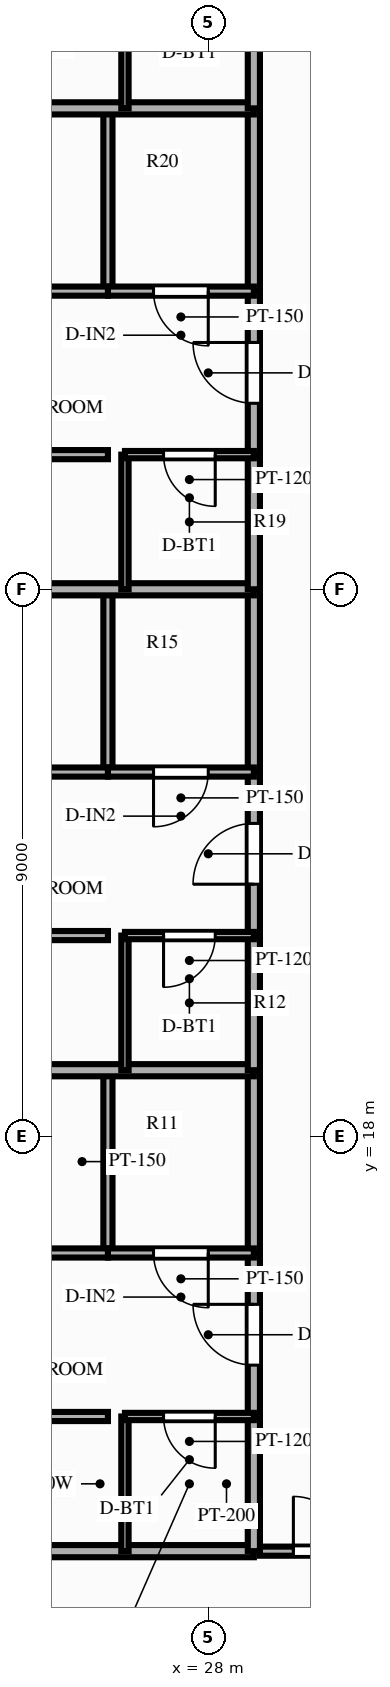
"""IFC4 building model, lengths in metres.
Left out: names, types, materials, properties, quantities, classifications, styles, units other than length and angle.
Written with IfcOpenShell. Run it as: python <this file> out.ifc"""

import sys

from ifc_helpers import new_model, si_unit, direction, frame, frame_2d, origin, place, context, subcontext, project, spatial, rectangle, extrude, source, transform, mapped, element, fill, save


model = new_model("IFC4")
c1 = context("Model", 3, precision=1e-05, world=origin(), true_north=direction((0.0, 1.0)))
c2 = subcontext(c1, "Body", "Model", "MODEL_VIEW")
j1 = project(units=[si_unit("LENGTHUNIT", "METRE"), si_unit("PLANEANGLEUNIT", "RADIAN")], contexts=[c1])
p1 = place(None, origin())
s1 = spatial("IfcSite", under=j1, at=p1, CompositionType="ELEMENT")
p2 = place(p1, origin())
s2 = spatial("IfcBuilding", under=s1, at=p2, CompositionType="ELEMENT")
p3 = place(p2, frame((0.0, 0.0, 192.7)))
s3 = spatial("IfcBuildingStorey", under=s2, at=p3, CompositionType="ELEMENT", Elevation=192.7)
p4 = place(p3, frame((28.85, 11.18, 0.0), z_axis=(0.0, 0.0, 1.0), x_axis=(1.0, 0.0, 0.0)))
e1 = element("IfcWall", 1, at=p4, inside=s3, PredefinedType="PARTITIONING", context=c2, shape_type="SweptSolid", body=[
    extrude(rectangle(XDim=2.33, YDim=0.15, at=frame_2d((1.165, 0.0))), origin(), (0.0, 0.0, 1.0), 2.24),
])
p5 = place(p4, frame((0.55, 0.0, 0.0)))
e2 = element("IfcOpeningElement", 2, at=p5, cuts=e1, PredefinedType="OPENING", context=c2, shape_type="SweptSolid", body=[
    extrude(rectangle(XDim=0.9, YDim=2.1, at=frame_2d((0.45, 1.05))), frame((0.0, 0.087, 0.0), z_axis=(0.0, -1.0, 0.0), x_axis=(1.0, 0.0, 0.0)), (0.0, 0.0, 1.0), 0.174),
])
p6 = place(p3, frame((28.75, 11.18, 0.0), z_axis=(0.0, 0.0, 1.0), x_axis=(-1.0, 0.0, 0.0)))
e3 = element("IfcWall", 3, at=p6, inside=s3, PredefinedType="PARTITIONING", context=c2, shape_type="SweptSolid", body=[
    extrude(rectangle(XDim=10.85, YDim=0.2, at=frame_2d((5.425, 0.0))), origin(), (0.0, 0.0, 1.0), 2.24),
])
p7 = place(p3, frame((28.75, 11.18, 0.0), z_axis=(0.0, 0.0, 1.0), x_axis=(0.0, 1.0, 0.0)))
e4 = element("IfcWall", 4, at=p7, inside=s3, PredefinedType="PARTITIONING", context=c2, shape_type="SweptSolid", body=[
    extrude(rectangle(XDim=2.215, YDim=0.2, at=frame_2d((1.107, 0.0))), origin(), (0.0, 0.0, 1.0), 3.56),
])
p8 = place(p3, frame((28.75, 13.395, 0.0), z_axis=(0.0, 0.0, 1.0), x_axis=(0.0, 1.0, 0.0)))
e5 = element("IfcWall", 5, at=p8, inside=s3, PredefinedType="PARTITIONING", context=c2, shape_type="SweptSolid", body=[
    extrude(rectangle(XDim=2.689, YDim=0.2, at=frame_2d((1.345, 0.0))), origin(), (0.0, 0.0, 1.0), 3.56),
])
p9 = place(p8, frame((0.845, 0.0, 0.0)))
e6 = element("IfcOpeningElement", 6, at=p9, cuts=e5, PredefinedType="OPENING", context=c2, shape_type="SweptSolid", body=[
    extrude(rectangle(XDim=1.0, YDim=2.15, at=frame_2d((0.5, 1.075))), frame((0.0, 0.112, 0.0), z_axis=(0.0, -1.0, 0.0), x_axis=(1.0, 0.0, 0.0)), (0.0, 0.0, 1.0), 0.224),
])
p10 = place(p3, frame((28.75, 16.084, 0.0), z_axis=(0.0, 0.0, 1.0), x_axis=(0.0, 1.0, 0.0)))
e7 = element("IfcWall", 7, at=p10, inside=s3, PredefinedType="PARTITIONING", context=c2, shape_type="SweptSolid", body=[
    extrude(rectangle(XDim=3.006, YDim=0.2, at=frame_2d((1.503, 0.0))), origin(), (0.0, 0.0, 1.0), 3.56),
])
p11 = place(p3, frame((26.63, 11.18, 0.0), z_axis=(0.0, 0.0, 1.0), x_axis=(0.0, 1.0, 0.0)))
e8 = element("IfcWall", 8, at=p11, inside=s3, PredefinedType="PARTITIONING", context=c2, shape_type="SweptSolid", body=[
    extrude(rectangle(XDim=2.215, YDim=0.12, at=frame_2d((1.107, 0.0))), origin(), (0.0, 0.0, 1.0), 3.56),
])
p12 = place(p3, frame((26.35, 16.084, 0.0), z_axis=(0.0, 0.0, 1.0), x_axis=(0.0, 1.0, 0.0)))
e9 = element("IfcWall", 9, at=p12, inside=s3, PredefinedType="PARTITIONING", context=c2, shape_type="SweptSolid", body=[
    extrude(rectangle(XDim=3.006, YDim=0.15, at=frame_2d((1.503, 0.0))), origin(), (0.0, 0.0, 1.0), 3.56),
])
p13 = place(p3, frame((28.75, 13.395, 0.0), z_axis=(0.0, 0.0, 1.0), x_axis=(-1.0, 0.0, 0.0)))
e10 = element("IfcWall", 10, at=p13, inside=s3, PredefinedType="PARTITIONING", context=c2, shape_type="SweptSolid", body=[
    extrude(rectangle(XDim=2.12, YDim=0.12, at=frame_2d((1.06, 0.0))), origin(), (0.0, 0.0, 1.0), 3.56),
])
p14 = place(p13, frame((0.635, 0.0, 0.0)))
e11 = element("IfcOpeningElement", 11, at=p14, cuts=e10, PredefinedType="OPENING", context=c2, shape_type="SweptSolid", body=[
    extrude(rectangle(XDim=0.85, YDim=2.05, at=frame_2d((0.425, 1.025))), frame((0.0, 0.072, 0.0), z_axis=(0.0, -1.0, 0.0), x_axis=(1.0, 0.0, 0.0)), (0.0, 0.0, 1.0), 0.144),
])
p15 = place(p3, frame((26.35, 13.395, 0.0), z_axis=(0.0, 0.0, 1.0), x_axis=(-1.0, 0.0, 0.0)))
e12 = element("IfcWall", 12, at=p15, inside=s3, PredefinedType="PARTITIONING", context=c2, shape_type="SweptSolid", body=[
    extrude(rectangle(XDim=8.45, YDim=0.15, at=frame_2d((4.225, 0.0))), origin(), (0.0, 0.0, 1.0), 3.56),
])
p16 = place(p15, frame((4.364, 0.0, 0.0)))
e13 = element("IfcOpeningElement", 13, at=p16, cuts=e12, PredefinedType="OPENING", context=c2, shape_type="SweptSolid", body=[
    extrude(rectangle(XDim=0.9, YDim=2.1, at=frame_2d((0.45, 1.05))), frame((0.0, 0.087, 0.0), z_axis=(0.0, -1.0, 0.0), x_axis=(1.0, 0.0, 0.0)), (0.0, 0.0, 1.0), 0.174),
])
p17 = place(p3, frame((28.75, 16.084, 0.0), z_axis=(0.0, 0.0, 1.0), x_axis=(-1.0, 0.0, 0.0)))
e14 = element("IfcWall", 14, at=p17, inside=s3, PredefinedType="PARTITIONING", context=c2, shape_type="SweptSolid", body=[
    extrude(rectangle(XDim=2.4, YDim=0.15, at=frame_2d((1.2, 0.0))), origin(), (0.0, 0.0, 1.0), 3.56),
])
p18 = place(p17, frame((0.75, 0.0, 0.0)))
e15 = element("IfcOpeningElement", 15, at=p18, cuts=e14, PredefinedType="OPENING", context=c2, shape_type="SweptSolid", body=[
    extrude(rectangle(XDim=0.9, YDim=2.1, at=frame_2d((0.45, 1.05))), frame((0.0, 0.087, 0.0), z_axis=(0.0, -1.0, 0.0), x_axis=(1.0, 0.0, 0.0)), (0.0, 0.0, 1.0), 0.174),
])
p19 = place(p3, frame((26.35, 16.084, 0.0), z_axis=(0.0, 0.0, 1.0), x_axis=(-1.0, 0.0, 0.0)))
e16 = element("IfcWall", 16, at=p19, inside=s3, PredefinedType="PARTITIONING", context=c2, shape_type="SweptSolid", body=[
    extrude(rectangle(XDim=8.45, YDim=0.15, at=frame_2d((4.225, 0.0))), origin(), (0.0, 0.0, 1.0), 3.56),
])
p20 = place(p19, frame((4.364, 0.0, 0.0)))
e17 = element("IfcOpeningElement", 17, at=p20, cuts=e16, PredefinedType="OPENING", context=c2, shape_type="SweptSolid", body=[
    extrude(rectangle(XDim=0.9, YDim=2.1, at=frame_2d((0.45, 1.05))), frame((0.0, 0.087, 0.0), z_axis=(0.0, -1.0, 0.0), x_axis=(1.0, 0.0, 0.0)), (0.0, 0.0, 1.0), 0.174),
])
p21 = place(p3, frame((28.75, 19.09, 0.0), z_axis=(0.0, 0.0, 1.0), x_axis=(-1.0, 0.0, 0.0)))
e18 = element("IfcWall", 18, at=p21, inside=s3, PredefinedType="PARTITIONING", context=c2, shape_type="SweptSolid", body=[
    extrude(rectangle(XDim=10.85, YDim=0.2, at=frame_2d((5.425, 0.0))), origin(), (0.0, 0.0, 1.0), 3.56),
])
p22 = place(p3, frame((28.75, 19.09, 0.0), z_axis=(0.0, 0.0, 1.0), x_axis=(0.0, 1.0, 0.0)))
e19 = element("IfcWall", 19, at=p22, inside=s3, PredefinedType="PARTITIONING", context=c2, shape_type="SweptSolid", body=[
    extrude(rectangle(XDim=2.215, YDim=0.2, at=frame_2d((1.107, 0.0))), origin(), (0.0, 0.0, 1.0), 3.56),
])
p23 = place(p3, frame((28.75, 21.305, 0.0), z_axis=(0.0, 0.0, 1.0), x_axis=(0.0, 1.0, 0.0)))
e20 = element("IfcWall", 20, at=p23, inside=s3, PredefinedType="PARTITIONING", context=c2, shape_type="SweptSolid", body=[
    extrude(rectangle(XDim=2.689, YDim=0.2, at=frame_2d((1.345, 0.0))), origin(), (0.0, 0.0, 1.0), 3.56),
])
p24 = place(p23, frame((0.845, 0.0, 0.0)))
e21 = element("IfcOpeningElement", 21, at=p24, cuts=e20, PredefinedType="OPENING", context=c2, shape_type="SweptSolid", body=[
    extrude(rectangle(XDim=1.0, YDim=2.15, at=frame_2d((0.5, 1.075))), frame((0.0, 0.112, 0.0), z_axis=(0.0, -1.0, 0.0), x_axis=(1.0, 0.0, 0.0)), (0.0, 0.0, 1.0), 0.224),
])
p25 = place(p3, frame((28.75, 23.994, 0.0), z_axis=(0.0, 0.0, 1.0), x_axis=(0.0, 1.0, 0.0)))
e22 = element("IfcWall", 22, at=p25, inside=s3, PredefinedType="PARTITIONING", context=c2, shape_type="SweptSolid", body=[
    extrude(rectangle(XDim=3.006, YDim=0.2, at=frame_2d((1.503, 0.0))), origin(), (0.0, 0.0, 1.0), 3.56),
])
p26 = place(p3, frame((26.63, 19.09, 0.0), z_axis=(0.0, 0.0, 1.0), x_axis=(0.0, 1.0, 0.0)))
e23 = element("IfcWall", 23, at=p26, inside=s3, PredefinedType="PARTITIONING", context=c2, shape_type="SweptSolid", body=[
    extrude(rectangle(XDim=2.215, YDim=0.12, at=frame_2d((1.107, 0.0))), origin(), (0.0, 0.0, 1.0), 3.56),
])
p27 = place(p3, frame((26.35, 23.994, 0.0), z_axis=(0.0, 0.0, 1.0), x_axis=(0.0, 1.0, 0.0)))
e24 = element("IfcWall", 24, at=p27, inside=s3, PredefinedType="PARTITIONING", context=c2, shape_type="SweptSolid", body=[
    extrude(rectangle(XDim=3.006, YDim=0.15, at=frame_2d((1.503, 0.0))), origin(), (0.0, 0.0, 1.0), 3.56),
])
p28 = place(p3, frame((28.75, 21.305, 0.0), z_axis=(0.0, 0.0, 1.0), x_axis=(-1.0, 0.0, 0.0)))
e25 = element("IfcWall", 25, at=p28, inside=s3, PredefinedType="PARTITIONING", context=c2, shape_type="SweptSolid", body=[
    extrude(rectangle(XDim=2.12, YDim=0.12, at=frame_2d((1.06, 0.0))), origin(), (0.0, 0.0, 1.0), 3.56),
])
p29 = place(p28, frame((0.635, 0.0, 0.0)))
e26 = element("IfcOpeningElement", 26, at=p29, cuts=e25, PredefinedType="OPENING", context=c2, shape_type="SweptSolid", body=[
    extrude(rectangle(XDim=0.85, YDim=2.05, at=frame_2d((0.425, 1.025))), frame((0.0, 0.072, 0.0), z_axis=(0.0, -1.0, 0.0), x_axis=(1.0, 0.0, 0.0)), (0.0, 0.0, 1.0), 0.144),
])
p30 = place(p3, frame((26.35, 21.305, 0.0), z_axis=(0.0, 0.0, 1.0), x_axis=(-1.0, 0.0, 0.0)))
e27 = element("IfcWall", 27, at=p30, inside=s3, PredefinedType="PARTITIONING", context=c2, shape_type="SweptSolid", body=[
    extrude(rectangle(XDim=8.45, YDim=0.15, at=frame_2d((4.225, 0.0))), origin(), (0.0, 0.0, 1.0), 3.56),
])
p31 = place(p30, frame((4.364, 0.0, 0.0)))
e28 = element("IfcOpeningElement", 28, at=p31, cuts=e27, PredefinedType="OPENING", context=c2, shape_type="SweptSolid", body=[
    extrude(rectangle(XDim=0.9, YDim=2.1, at=frame_2d((0.45, 1.05))), frame((0.0, 0.087, 0.0), z_axis=(0.0, -1.0, 0.0), x_axis=(1.0, 0.0, 0.0)), (0.0, 0.0, 1.0), 0.174),
])
p32 = place(p3, frame((28.75, 23.994, 0.0), z_axis=(0.0, 0.0, 1.0), x_axis=(-1.0, 0.0, 0.0)))
e29 = element("IfcWall", 29, at=p32, inside=s3, PredefinedType="PARTITIONING", context=c2, shape_type="SweptSolid", body=[
    extrude(rectangle(XDim=2.4, YDim=0.15, at=frame_2d((1.2, 0.0))), origin(), (0.0, 0.0, 1.0), 3.56),
])
p33 = place(p32, frame((0.75, 0.0, 0.0)))
e30 = element("IfcOpeningElement", 30, at=p33, cuts=e29, PredefinedType="OPENING", context=c2, shape_type="SweptSolid", body=[
    extrude(rectangle(XDim=0.9, YDim=2.1, at=frame_2d((0.45, 1.05))), frame((0.0, 0.087, 0.0), z_axis=(0.0, -1.0, 0.0), x_axis=(1.0, 0.0, 0.0)), (0.0, 0.0, 1.0), 0.174),
])
p34 = place(p3, frame((26.35, 23.994, 0.0), z_axis=(0.0, 0.0, 1.0), x_axis=(-1.0, 0.0, 0.0)))
e31 = element("IfcWall", 31, at=p34, inside=s3, PredefinedType="PARTITIONING", context=c2, shape_type="SweptSolid", body=[
    extrude(rectangle(XDim=8.45, YDim=0.15, at=frame_2d((4.225, 0.0))), origin(), (0.0, 0.0, 1.0), 3.56),
])
p35 = place(p34, frame((4.364, 0.0, 0.0)))
e32 = element("IfcOpeningElement", 32, at=p35, cuts=e31, PredefinedType="OPENING", context=c2, shape_type="SweptSolid", body=[
    extrude(rectangle(XDim=0.9, YDim=2.1, at=frame_2d((0.45, 1.05))), frame((0.0, 0.087, 0.0), z_axis=(0.0, -1.0, 0.0), x_axis=(1.0, 0.0, 0.0)), (0.0, 0.0, 1.0), 0.174),
])
p36 = place(p3, frame((28.75, 27.0, 0.0), z_axis=(0.0, 0.0, 1.0), x_axis=(-1.0, 0.0, 0.0)))
e33 = element("IfcWall", 33, at=p36, inside=s3, PredefinedType="PARTITIONING", context=c2, shape_type="SweptSolid", body=[
    extrude(rectangle(XDim=10.85, YDim=0.2, at=frame_2d((5.425, 0.0))), origin(), (0.0, 0.0, 1.0), 3.56),
])
p37 = place(p3, frame((28.75, 27.0, 0.0), z_axis=(0.0, 0.0, 1.0), x_axis=(0.0, 1.0, 0.0)))
e34 = element("IfcWall", 34, at=p37, inside=s3, PredefinedType="PARTITIONING", context=c2, shape_type="SweptSolid", body=[
    extrude(rectangle(XDim=2.215, YDim=0.2, at=frame_2d((1.107, 0.0))), origin(), (0.0, 0.0, 1.0), 3.56),
])
p38 = place(p3, frame((28.75, 29.215, 0.0), z_axis=(0.0, 0.0, 1.0), x_axis=(0.0, 1.0, 0.0)))
e35 = element("IfcWall", 35, at=p38, inside=s3, PredefinedType="PARTITIONING", context=c2, shape_type="SweptSolid", body=[
    extrude(rectangle(XDim=2.689, YDim=0.2, at=frame_2d((1.345, 0.0))), origin(), (0.0, 0.0, 1.0), 3.56),
])
p39 = place(p38, frame((0.845, 0.0, 0.0)))
e36 = element("IfcOpeningElement", 36, at=p39, cuts=e35, PredefinedType="OPENING", context=c2, shape_type="SweptSolid", body=[
    extrude(rectangle(XDim=1.0, YDim=2.15, at=frame_2d((0.5, 1.075))), frame((0.0, 0.112, 0.0), z_axis=(0.0, -1.0, 0.0), x_axis=(1.0, 0.0, 0.0)), (0.0, 0.0, 1.0), 0.224),
])
p40 = place(p3, frame((28.75, 31.904, 0.0), z_axis=(0.0, 0.0, 1.0), x_axis=(0.0, 1.0, 0.0)))
e37 = element("IfcWall", 37, at=p40, inside=s3, PredefinedType="PARTITIONING", context=c2, shape_type="SweptSolid", body=[
    extrude(rectangle(XDim=3.006, YDim=0.2, at=frame_2d((1.503, 0.0))), origin(), (0.0, 0.0, 1.0), 3.56),
])
p41 = place(p3, frame((26.63, 27.0, 0.0), z_axis=(0.0, 0.0, 1.0), x_axis=(0.0, 1.0, 0.0)))
e38 = element("IfcWall", 38, at=p41, inside=s3, PredefinedType="PARTITIONING", context=c2, shape_type="SweptSolid", body=[
    extrude(rectangle(XDim=2.215, YDim=0.12, at=frame_2d((1.107, 0.0))), origin(), (0.0, 0.0, 1.0), 3.56),
])
p42 = place(p3, frame((26.35, 31.904, 0.0), z_axis=(0.0, 0.0, 1.0), x_axis=(0.0, 1.0, 0.0)))
e39 = element("IfcWall", 39, at=p42, inside=s3, PredefinedType="PARTITIONING", context=c2, shape_type="SweptSolid", body=[
    extrude(rectangle(XDim=3.006, YDim=0.15, at=frame_2d((1.503, 0.0))), origin(), (0.0, 0.0, 1.0), 3.56),
])
p43 = place(p3, frame((28.75, 29.215, 0.0), z_axis=(0.0, 0.0, 1.0), x_axis=(-1.0, 0.0, 0.0)))
e40 = element("IfcWall", 40, at=p43, inside=s3, PredefinedType="PARTITIONING", context=c2, shape_type="SweptSolid", body=[
    extrude(rectangle(XDim=2.12, YDim=0.12, at=frame_2d((1.06, 0.0))), origin(), (0.0, 0.0, 1.0), 3.56),
])
p44 = place(p43, frame((0.635, 0.0, 0.0)))
e41 = element("IfcOpeningElement", 41, at=p44, cuts=e40, PredefinedType="OPENING", context=c2, shape_type="SweptSolid", body=[
    extrude(rectangle(XDim=0.85, YDim=2.05, at=frame_2d((0.425, 1.025))), frame((0.0, 0.072, 0.0), z_axis=(0.0, -1.0, 0.0), x_axis=(1.0, 0.0, 0.0)), (0.0, 0.0, 1.0), 0.144),
])
p45 = place(p3, frame((26.35, 29.215, 0.0), z_axis=(0.0, 0.0, 1.0), x_axis=(-1.0, 0.0, 0.0)))
e42 = element("IfcWall", 42, at=p45, inside=s3, PredefinedType="PARTITIONING", context=c2, shape_type="SweptSolid", body=[
    extrude(rectangle(XDim=8.45, YDim=0.15, at=frame_2d((4.225, 0.0))), origin(), (0.0, 0.0, 1.0), 3.56),
])
p46 = place(p45, frame((4.364, 0.0, 0.0)))
e43 = element("IfcOpeningElement", 43, at=p46, cuts=e42, PredefinedType="OPENING", context=c2, shape_type="SweptSolid", body=[
    extrude(rectangle(XDim=0.9, YDim=2.1, at=frame_2d((0.45, 1.05))), frame((0.0, 0.087, 0.0), z_axis=(0.0, -1.0, 0.0), x_axis=(1.0, 0.0, 0.0)), (0.0, 0.0, 1.0), 0.174),
])
p47 = place(p3, frame((28.75, 31.904, 0.0), z_axis=(0.0, 0.0, 1.0), x_axis=(-1.0, 0.0, 0.0)))
e44 = element("IfcWall", 44, at=p47, inside=s3, PredefinedType="PARTITIONING", context=c2, shape_type="SweptSolid", body=[
    extrude(rectangle(XDim=2.4, YDim=0.15, at=frame_2d((1.2, 0.0))), origin(), (0.0, 0.0, 1.0), 3.29),
])
p48 = place(p47, frame((0.75, 0.0, 0.0)))
e45 = element("IfcOpeningElement", 45, at=p48, cuts=e44, PredefinedType="OPENING", context=c2, shape_type="SweptSolid", body=[
    extrude(rectangle(XDim=0.9, YDim=2.1, at=frame_2d((0.45, 1.05))), frame((0.0, 0.087, 0.0), z_axis=(0.0, -1.0, 0.0), x_axis=(1.0, 0.0, 0.0)), (0.0, 0.0, 1.0), 0.174),
])
p49 = place(p3, frame((26.35, 31.904, 0.0), z_axis=(0.0, 0.0, 1.0), x_axis=(-1.0, 0.0, 0.0)))
e46 = element("IfcWall", 46, at=p49, inside=s3, PredefinedType="PARTITIONING", context=c2, shape_type="SweptSolid", body=[
    extrude(rectangle(XDim=8.45, YDim=0.15, at=frame_2d((4.225, 0.0))), origin(), (0.0, 0.0, 1.0), 3.29),
])
p50 = place(p49, frame((4.364, 0.0, 0.0)))
e47 = element("IfcOpeningElement", 47, at=p50, cuts=e46, PredefinedType="OPENING", context=c2, shape_type="SweptSolid", body=[
    extrude(rectangle(XDim=0.9, YDim=2.1, at=frame_2d((0.45, 1.05))), frame((0.0, 0.087, 0.0), z_axis=(0.0, -1.0, 0.0), x_axis=(1.0, 0.0, 0.0)), (0.0, 0.0, 1.0), 0.174),
])
p51 = place(p3, frame((28.75, 34.91, 0.0), z_axis=(0.0, 0.0, 1.0), x_axis=(-1.0, 0.0, 0.0)))
e48 = element("IfcWall", 48, at=p51, inside=s3, PredefinedType="PARTITIONING", context=c2, shape_type="SweptSolid", body=[
    extrude(rectangle(XDim=10.85, YDim=0.2, at=frame_2d((5.425, 0.0))), origin(), (0.0, 0.0, 1.0), 3.56),
])
p52 = place(p3, frame((28.75, 34.91, 0.0), z_axis=(0.0, 0.0, 1.0), x_axis=(0.0, 1.0, 0.0)))
e49 = element("IfcWall", 49, at=p52, inside=s3, PredefinedType="PARTITIONING", context=c2, shape_type="SweptSolid", body=[
    extrude(rectangle(XDim=2.41, YDim=0.2, at=frame_2d((1.205, 0.0))), origin(), (0.0, 0.0, 1.0), 3.56),
])
p53 = place(p3, frame((26.63, 34.91, 0.0), z_axis=(0.0, 0.0, 1.0), x_axis=(0.0, 1.0, 0.0)))
e50 = element("IfcWall", 50, at=p53, inside=s3, PredefinedType="PARTITIONING", context=c2, shape_type="SweptSolid", body=[
    extrude(rectangle(XDim=2.41, YDim=0.12, at=frame_2d((1.205, 0.0))), origin(), (0.0, 0.0, 1.0), 3.56),
])
m1 = source(origin(), c2, "Body", "SweptSolid", [
    extrude(rectangle(XDim=0.9, YDim=2.1, at=frame_2d((0.45, 1.05))), frame((0.0, 0.025, 0.0), z_axis=(0.0, -1.0, 0.0), x_axis=(1.0, 0.0, 0.0)), (0.0, 0.0, 1.0), 0.05),
])
p54 = place(p5, origin())
e51 = element("IfcDoor", 51, at=p54, inside=s3, OperationType="SINGLE_SWING_LEFT", PredefinedType="DOOR", context=c2, shape_type="MappedRepresentation", body=[
    mapped(m1, transform((0.0, 0.0, 0.0), scale=1.0)),
])
fill(e2, e51)
m2 = source(origin(), c2, "Body", "SweptSolid", [
    extrude(rectangle(XDim=1.0, YDim=2.15, at=frame_2d((0.5, 1.075))), frame((0.0, 0.025, 0.0), z_axis=(0.0, -1.0, 0.0), x_axis=(1.0, 0.0, 0.0)), (0.0, 0.0, 1.0), 0.05),
])
p55 = place(p9, origin())
e52 = element("IfcDoor", 52, at=p55, inside=s3, OperationType="SINGLE_SWING_RIGHT", PredefinedType="DOOR", context=c2, shape_type="MappedRepresentation", body=[
    mapped(m2, transform((0.0, 0.0, 0.0), scale=1.0)),
])
fill(e6, e52)
m3 = source(origin(), c2, "Body", "SweptSolid", [
    extrude(rectangle(XDim=0.85, YDim=2.05, at=frame_2d((0.425, 1.025))), frame((0.0, 0.025, 0.0), z_axis=(0.0, -1.0, 0.0), x_axis=(1.0, 0.0, 0.0)), (0.0, 0.0, 1.0), 0.05),
])
p56 = place(p14, origin())
e53 = element("IfcDoor", 53, at=p56, inside=s3, OperationType="SINGLE_SWING_LEFT", PredefinedType="DOOR", context=c2, shape_type="MappedRepresentation", body=[
    mapped(m3, transform((0.0, 0.0, 0.0), scale=1.0)),
])
fill(e11, e53)
p57 = place(p18, origin())
e54 = element("IfcDoor", 54, at=p57, inside=s3, OperationType="SINGLE_SWING_LEFT", PredefinedType="DOOR", context=c2, shape_type="MappedRepresentation", body=[
    mapped(m1, transform((0.0, 0.0, 0.0), scale=1.0)),
])
fill(e15, e54)
p58 = place(p24, origin())
e55 = element("IfcDoor", 55, at=p58, inside=s3, OperationType="SINGLE_SWING_LEFT", PredefinedType="DOOR", context=c2, shape_type="MappedRepresentation", body=[
    mapped(m2, transform((0.0, 0.0, 0.0), scale=1.0)),
])
fill(e21, e55)
p59 = place(p29, origin())
e56 = element("IfcDoor", 56, at=p59, inside=s3, OperationType="SINGLE_SWING_RIGHT", PredefinedType="DOOR", context=c2, shape_type="MappedRepresentation", body=[
    mapped(m3, transform((0.0, 0.0, 0.0), scale=1.0)),
])
fill(e26, e56)
p60 = place(p33, origin())
e57 = element("IfcDoor", 57, at=p60, inside=s3, OperationType="SINGLE_SWING_RIGHT", PredefinedType="DOOR", context=c2, shape_type="MappedRepresentation", body=[
    mapped(m1, transform((0.0, 0.0, 0.0), scale=1.0)),
])
fill(e30, e57)
p61 = place(p39, origin())
e58 = element("IfcDoor", 58, at=p61, inside=s3, OperationType="SINGLE_SWING_RIGHT", PredefinedType="DOOR", context=c2, shape_type="MappedRepresentation", body=[
    mapped(m2, transform((0.0, 0.0, 0.0), scale=1.0)),
])
fill(e36, e58)
p62 = place(p44, origin())
e59 = element("IfcDoor", 59, at=p62, inside=s3, OperationType="SINGLE_SWING_LEFT", PredefinedType="DOOR", context=c2, shape_type="MappedRepresentation", body=[
    mapped(m3, transform((0.0, 0.0, 0.0), scale=1.0)),
])
fill(e41, e59)
p63 = place(p48, origin())
e60 = element("IfcDoor", 60, at=p63, inside=s3, OperationType="SINGLE_SWING_LEFT", PredefinedType="DOOR", context=c2, shape_type="MappedRepresentation", body=[
    mapped(m1, transform((0.0, 0.0, 0.0), scale=1.0)),
])
fill(e45, e60)
save(model, sys.argv[1])
